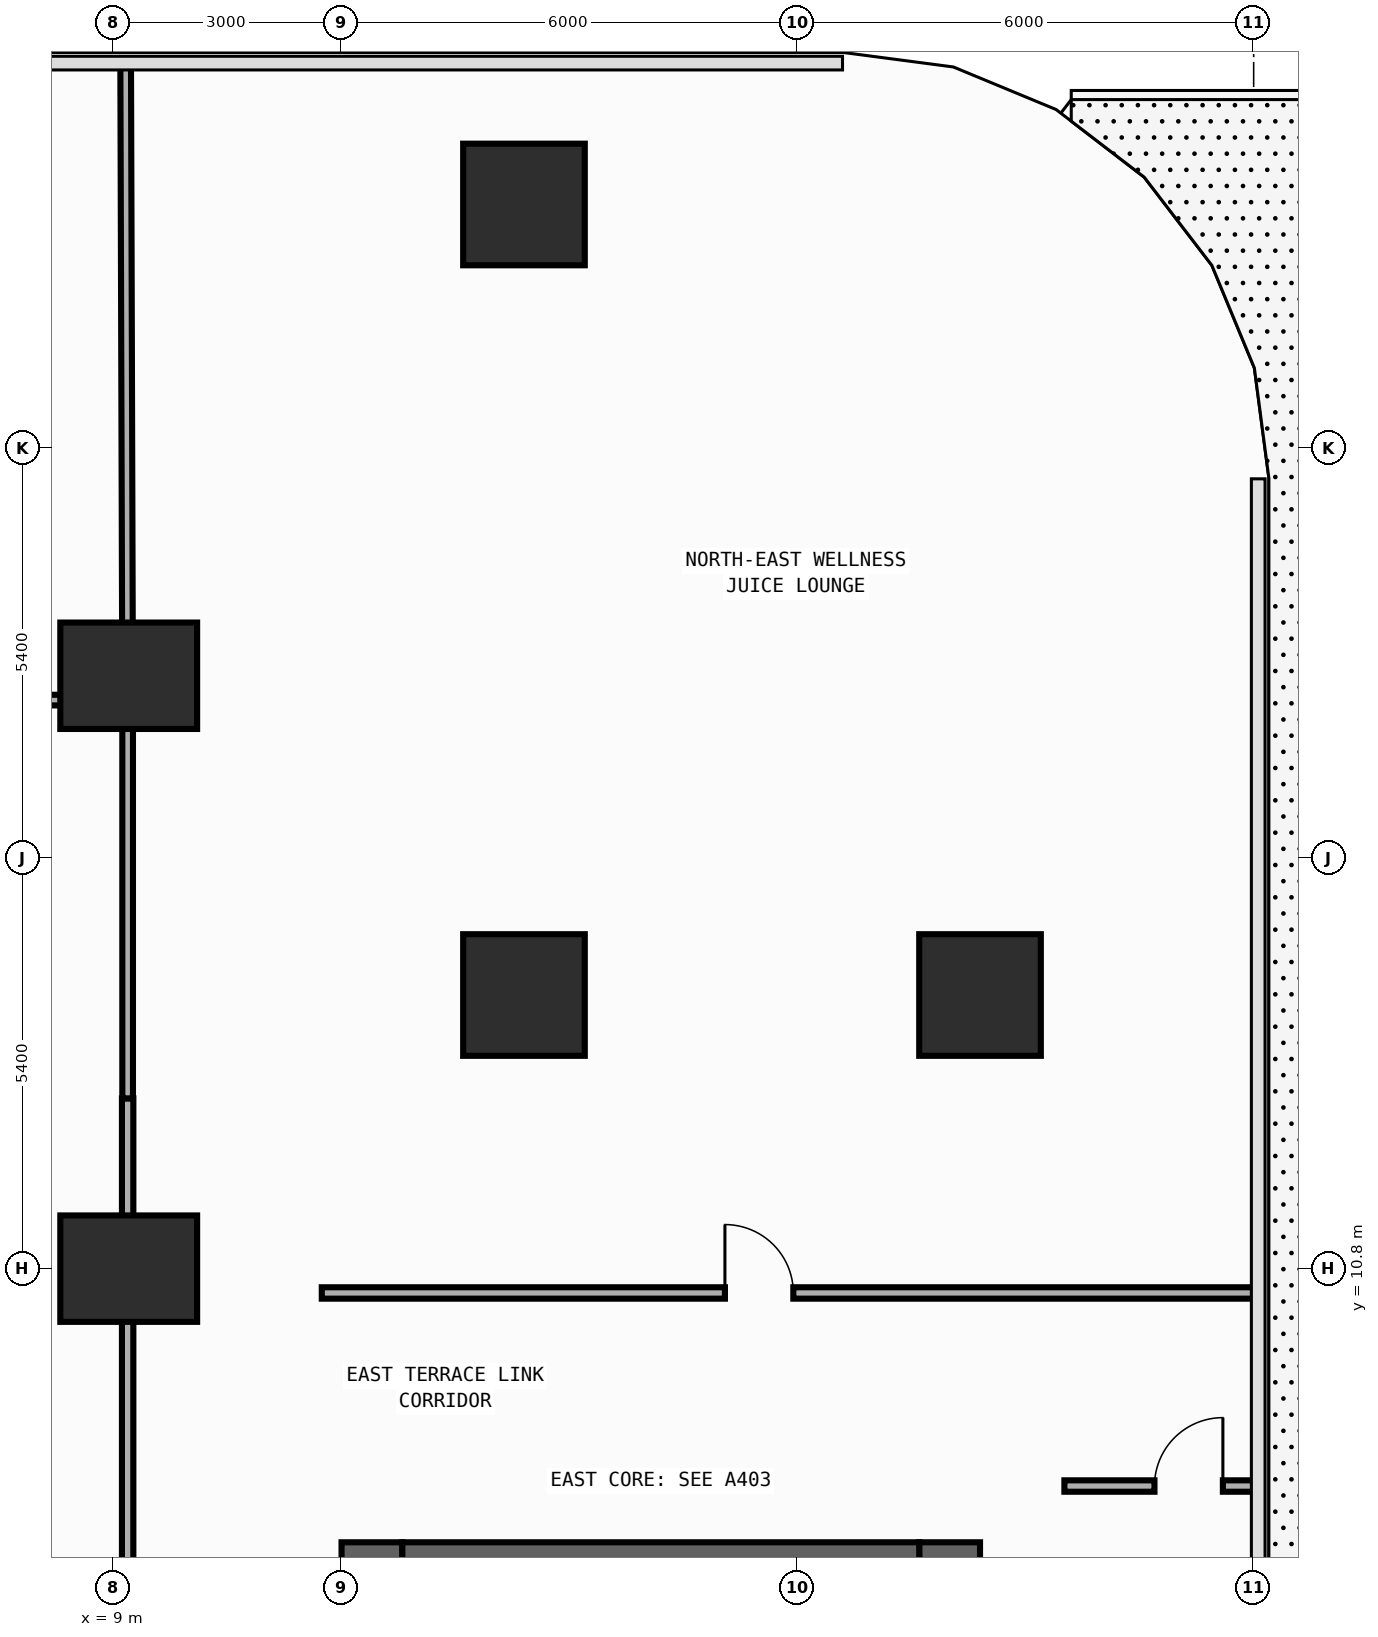
"""IFC4 building model, lengths in metres.
Left out: names, types, materials, properties, quantities, classifications, styles, units other than length and angle.
Written with IfcOpenShell. Run it as: python <this file> out.ifc"""

import sys

from ifc_helpers import new_model, si_unit, direction, frame, frame_2d, origin, origin_2d, place, context, subcontext, project, spatial, rectangle, extrude, element, fill, save


model = new_model("IFC4")
c1 = context("Model", 3, precision=1e-05, world=origin(), true_north=direction((0.0, 1.0)))
c2 = subcontext(c1, "Body", "Model", "MODEL_VIEW")
j1 = project(units=[si_unit("LENGTHUNIT", "METRE"), si_unit("PLANEANGLEUNIT", "RADIAN")], contexts=[c1])
p1 = place(None, origin())
s1 = spatial("IfcSite", under=j1, at=p1, CompositionType="ELEMENT")
p2 = place(p1, origin())
s2 = spatial("IfcBuilding", under=s1, at=p2, CompositionType="ELEMENT")
p3 = place(p2, frame((0.0, 0.0, 21.0)))
s3 = spatial("IfcBuildingStorey", under=s2, at=p3, CompositionType="ELEMENT", Elevation=21.0)
p4 = place(p3, frame((12.4, -19.8, 0.0), z_axis=(0.0, 0.0, 1.0), x_axis=(0.0, 1.0, 0.0)))
e1 = element("IfcWall", 1, at=p4, inside=s3, PredefinedType="SHEAR", context=c2, shape_type="SweptSolid", body=[
    extrude(rectangle(XDim=27.0, YDim=0.8, at=frame_2d((13.5, 0.0))), origin(), (0.0, 0.0, 1.0), 4.74),
])
p5 = place(p4, frame((23.05, 0.0, 0.0)))
e2 = element("IfcOpeningElement", 2, at=p5, cuts=e1, PredefinedType="OPENING", context=c2, shape_type="SweptSolid", body=[
    extrude(rectangle(XDim=1.1, YDim=2.2, at=frame_2d((0.55, 1.1))), frame((0.0, 0.41, 0.0), z_axis=(0.0, -1.0, 0.0), x_axis=(1.0, 0.0, 0.0)), (0.0, 0.0, 1.0), 0.82),
])
p6 = place(p4, frame((19.85, 0.0, 0.0)))
e3 = element("IfcOpeningElement", 3, at=p6, cuts=e1, PredefinedType="OPENING", context=c2, shape_type="SweptSolid", body=[
    extrude(rectangle(XDim=1.1, YDim=2.2, at=frame_2d((0.55, 1.1))), frame((0.0, 0.41, 0.0), z_axis=(0.0, -1.0, 0.0), x_axis=(1.0, 0.0, 0.0)), (0.0, 0.0, 1.0), 0.82),
])
p7 = place(p4, frame((16.65, 0.0, 0.0)))
e4 = element("IfcOpeningElement", 4, at=p7, cuts=e1, PredefinedType="OPENING", context=c2, shape_type="SweptSolid", body=[
    extrude(rectangle(XDim=1.1, YDim=2.2, at=frame_2d((0.55, 1.1))), frame((0.0, 0.41, 0.0), z_axis=(0.0, -1.0, 0.0), x_axis=(1.0, 0.0, 0.0)), (0.0, 0.0, 1.0), 0.82),
])
p8 = place(p4, frame((10.175, 0.0, 0.0)))
e5 = element("IfcOpeningElement", 5, at=p8, cuts=e1, PredefinedType="OPENING", context=c2, shape_type="SweptSolid", body=[
    extrude(rectangle(XDim=0.85, YDim=2.1, at=frame_2d((0.425, 1.05))), frame((0.0, 0.41, 0.0), z_axis=(0.0, -1.0, 0.0), x_axis=(1.0, 0.0, 0.0)), (0.0, 0.0, 1.0), 0.82),
])
p9 = place(p4, frame((12.725, 0.0, 0.0)))
e6 = element("IfcOpeningElement", 6, at=p9, cuts=e1, PredefinedType="OPENING", context=c2, shape_type="SweptSolid", body=[
    extrude(rectangle(XDim=1.15, YDim=2.2, at=frame_2d((0.575, 1.1))), frame((0.0, 0.41, 0.0), z_axis=(0.0, -1.0, 0.0), x_axis=(1.0, 0.0, 0.0)), (0.0, 0.0, 1.0), 0.82),
])
p10 = place(p4, frame((25.125, 0.0, 0.0)))
e7 = element("IfcOpeningElement", 7, at=p10, cuts=e1, PredefinedType="OPENING", context=c2, shape_type="SweptSolid", body=[
    extrude(rectangle(XDim=0.85, YDim=2.1, at=frame_2d((0.425, 1.05))), frame((0.0, 0.41, 0.0), z_axis=(0.0, -1.0, 0.0), x_axis=(1.0, 0.0, 0.0)), (0.0, 0.0, 1.0), 0.82),
])
p11 = place(p3, frame((20.0, -19.8, 0.0), z_axis=(0.0, 0.0, 1.0), x_axis=(0.0, 1.0, 0.0)))
e8 = element("IfcWall", 8, at=p11, inside=s3, PredefinedType="SHEAR", context=c2, shape_type="SweptSolid", body=[
    extrude(rectangle(XDim=27.0, YDim=0.8, at=frame_2d((13.5, 0.0))), origin(), (0.0, 0.0, 1.0), 4.74),
])
p12 = place(p3, frame((12.8, 6.8, 0.0), z_axis=(0.0, 0.0, 1.0), x_axis=(1.0, 0.0, 0.0)))
e9 = element("IfcWall", 9, at=p12, inside=s3, PredefinedType="SHEAR", context=c2, shape_type="SweptSolid", body=[
    extrude(rectangle(XDim=6.8, YDim=0.8, at=frame_2d((3.4, 0.0))), origin(), (0.0, 0.0, 1.0), 4.74),
])
for number, where, z_axis, x_axis in (
    (10, (9.2, 10.8, 0.0), (0.0, 0.0, 1.0), (1.0, 0.0, 0.0)),
    (11, (9.2, 18.6, 0.0), (0.0, 0.0, 1.0), (1.0, 0.0, 0.0)),
):
    element("IfcColumn", number, at=place(p3, frame(where, z_axis=z_axis, x_axis=x_axis)), inside=s3, PredefinedType="COLUMN", context=c2, shape_type="SweptSolid", body=[
        extrude(rectangle(XDim=1.8, YDim=1.4, at=origin_2d()), origin(), (0.0, 0.0, 1.0), 5.0),
    ])
for number, where, z_axis, x_axis in (
    (12, (20.4, 14.4, 0.0), (0.0, 0.0, 1.0), (1.0, 0.0, 0.0)),
    (13, (14.4, 14.4, 0.0), (0.0, 0.0, 1.0), (1.0, 0.0, 0.0)),
    (14, (14.4, 24.8, 0.0), (0.0, 0.0, 1.0), (1.0, 0.0, 0.0)),
):
    element("IfcColumn", number, at=place(p3, frame(where, z_axis=z_axis, x_axis=x_axis)), inside=s3, PredefinedType="COLUMN", context=c2, shape_type="SweptSolid", body=[
        extrude(rectangle(XDim=1.6, YDim=1.6, at=origin_2d()), origin(), (0.0, 0.0, 1.0), 5.0),
    ])
p13 = place(p3, frame((9.186, 0.899, 0.0), z_axis=(0.0, 0.0, 1.0), x_axis=(0.0, 1.0, 0.0)))
e15 = element("IfcWall", 15, at=p13, inside=s3, PredefinedType="PARTITIONING", context=c2, shape_type="SweptSolid", body=[
    extrude(rectangle(XDim=12.141, YDim=0.15, at=frame_2d((6.07, 0.0))), origin(), (0.0, 0.0, 1.0), 3.94),
])
p14 = place(p13, frame((4.103, 0.0, 0.0)))
e16 = element("IfcOpeningElement", 16, at=p14, cuts=e15, PredefinedType="OPENING", context=c2, shape_type="SweptSolid", body=[
    extrude(rectangle(XDim=0.9, YDim=2.15, at=frame_2d((0.45, 1.075))), frame((0.0, 0.085, 0.0), z_axis=(0.0, -1.0, 0.0), x_axis=(1.0, 0.0, 0.0)), (0.0, 0.0, 1.0), 0.17),
])
p15 = place(p3, frame((21.51, 7.94, 0.0), z_axis=(0.0, 0.0, 1.0), x_axis=(1.0, 0.0, 0.0)))
e17 = element("IfcWall", 17, at=p15, inside=s3, PredefinedType="PARTITIONING", context=c2, shape_type="SweptSolid", body=[
    extrude(rectangle(XDim=2.545, YDim=0.15, at=frame_2d((1.272, 0.0))), origin(), (0.0, 0.0, 1.0), 4.74),
])
p16 = place(p15, frame((1.185, 0.0, 0.0)))
e18 = element("IfcOpeningElement", 18, at=p16, cuts=e17, PredefinedType="OPENING", context=c2, shape_type="SweptSolid", body=[
    extrude(rectangle(XDim=0.9, YDim=2.15, at=frame_2d((0.45, 1.075))), frame((0.0, 0.085, 0.0), z_axis=(0.0, -1.0, 0.0), x_axis=(1.0, 0.0, 0.0)), (0.0, 0.0, 1.0), 0.17),
])
p17 = place(p3, frame((11.74, 10.48, 0.0), z_axis=(0.0, 0.0, 1.0), x_axis=(1.0, 0.0, 0.0)))
e19 = element("IfcWall", 19, at=p17, inside=s3, PredefinedType="PARTITIONING", context=c2, shape_type="SweptSolid", body=[
    extrude(rectangle(XDim=12.315, YDim=0.15, at=frame_2d((6.157, 0.0))), origin(), (0.0, 0.0, 1.0), 4.74),
])
p18 = place(p17, frame((5.304, 0.0, 0.0)))
e20 = element("IfcOpeningElement", 20, at=p18, cuts=e19, PredefinedType="OPENING", context=c2, shape_type="SweptSolid", body=[
    extrude(rectangle(XDim=0.9, YDim=2.15, at=frame_2d((0.45, 1.075))), frame((0.0, 0.085, 0.0), z_axis=(0.0, -1.0, 0.0), x_axis=(1.0, 0.0, 0.0)), (0.0, 0.0, 1.0), 0.17),
])
p19 = place(p3, frame((9.186, 13.04, 0.0), z_axis=(0.0, 0.0, 1.0), x_axis=(0.0, 1.0, 0.0)))
e21 = element("IfcWall", 21, at=p19, inside=s3, PredefinedType="PARTITIONING", context=c2, shape_type="SweptSolid", body=[
    extrude(rectangle(XDim=5.24, YDim=0.14, at=frame_2d((2.62, 0.0))), origin(), (0.0, 0.0, 1.0), 3.94),
])
p20 = place(p3, frame((9.186, 18.28, 0.0), z_axis=(0.0, 0.0, 1.0), x_axis=(-0.003090003905, 0.999995225927, 0.0)))
e22 = element("IfcWall", 22, at=p20, inside=s3, PredefinedType="PARTITIONING", context=c2, shape_type="SweptSolid", body=[
    extrude(rectangle(XDim=8.375, YDim=0.14, at=frame_2d((4.188, 0.0))), origin(), (0.0, 0.0, 1.0), 3.94),
])
p21 = place(p3, frame((-10.19, 18.28, 0.0), z_axis=(0.0, 0.0, 1.0), x_axis=(1.0, 0.0, 0.0)))
e23 = element("IfcWall", 23, at=p21, inside=s3, PredefinedType="PARTITIONING", context=c2, shape_type="SweptSolid", body=[
    extrude(rectangle(XDim=19.306, YDim=0.14, at=frame_2d((9.653, 0.0))), origin(), (0.0, 0.0, 1.0), 3.94),
])
p22 = place(p21, frame((16.585, 0.0, 0.0)))
e24 = element("IfcOpeningElement", 24, at=p22, cuts=e23, PredefinedType="OPENING", context=c2, shape_type="SweptSolid", body=[
    extrude(rectangle(XDim=0.85, YDim=2.1, at=frame_2d((0.425, 1.05))), frame((0.0, 0.08, 0.0), z_axis=(0.0, -1.0, 0.0), x_axis=(1.0, 0.0, 0.0)), (0.0, 0.0, 1.0), 0.16),
])
p23 = place(p16, origin())
e25 = element("IfcDoor", 25, at=p23, inside=s3, OperationType="SINGLE_SWING_RIGHT", PredefinedType="DOOR", context=c2, shape_type="SweptSolid", body=[
    extrude(rectangle(XDim=0.9, YDim=2.15, at=frame_2d((0.45, 1.075))), frame((0.0, 0.025, 0.0), z_axis=(0.0, -1.0, 0.0), x_axis=(1.0, 0.0, 0.0)), (0.0, 0.0, 1.0), 0.05),
])
fill(e18, e25)
p24 = place(p18, origin())
e26 = element("IfcDoor", 26, at=p24, inside=s3, OperationType="SINGLE_SWING_LEFT", PredefinedType="DOOR", context=c2, shape_type="SweptSolid", body=[
    extrude(rectangle(XDim=0.9, YDim=2.15, at=frame_2d((0.45, 1.075))), frame((0.0, 0.025, 0.0), z_axis=(0.0, -1.0, 0.0), x_axis=(1.0, 0.0, 0.0)), (0.0, 0.0, 1.0), 0.05),
])
fill(e20, e26)
save(model, sys.argv[1])
